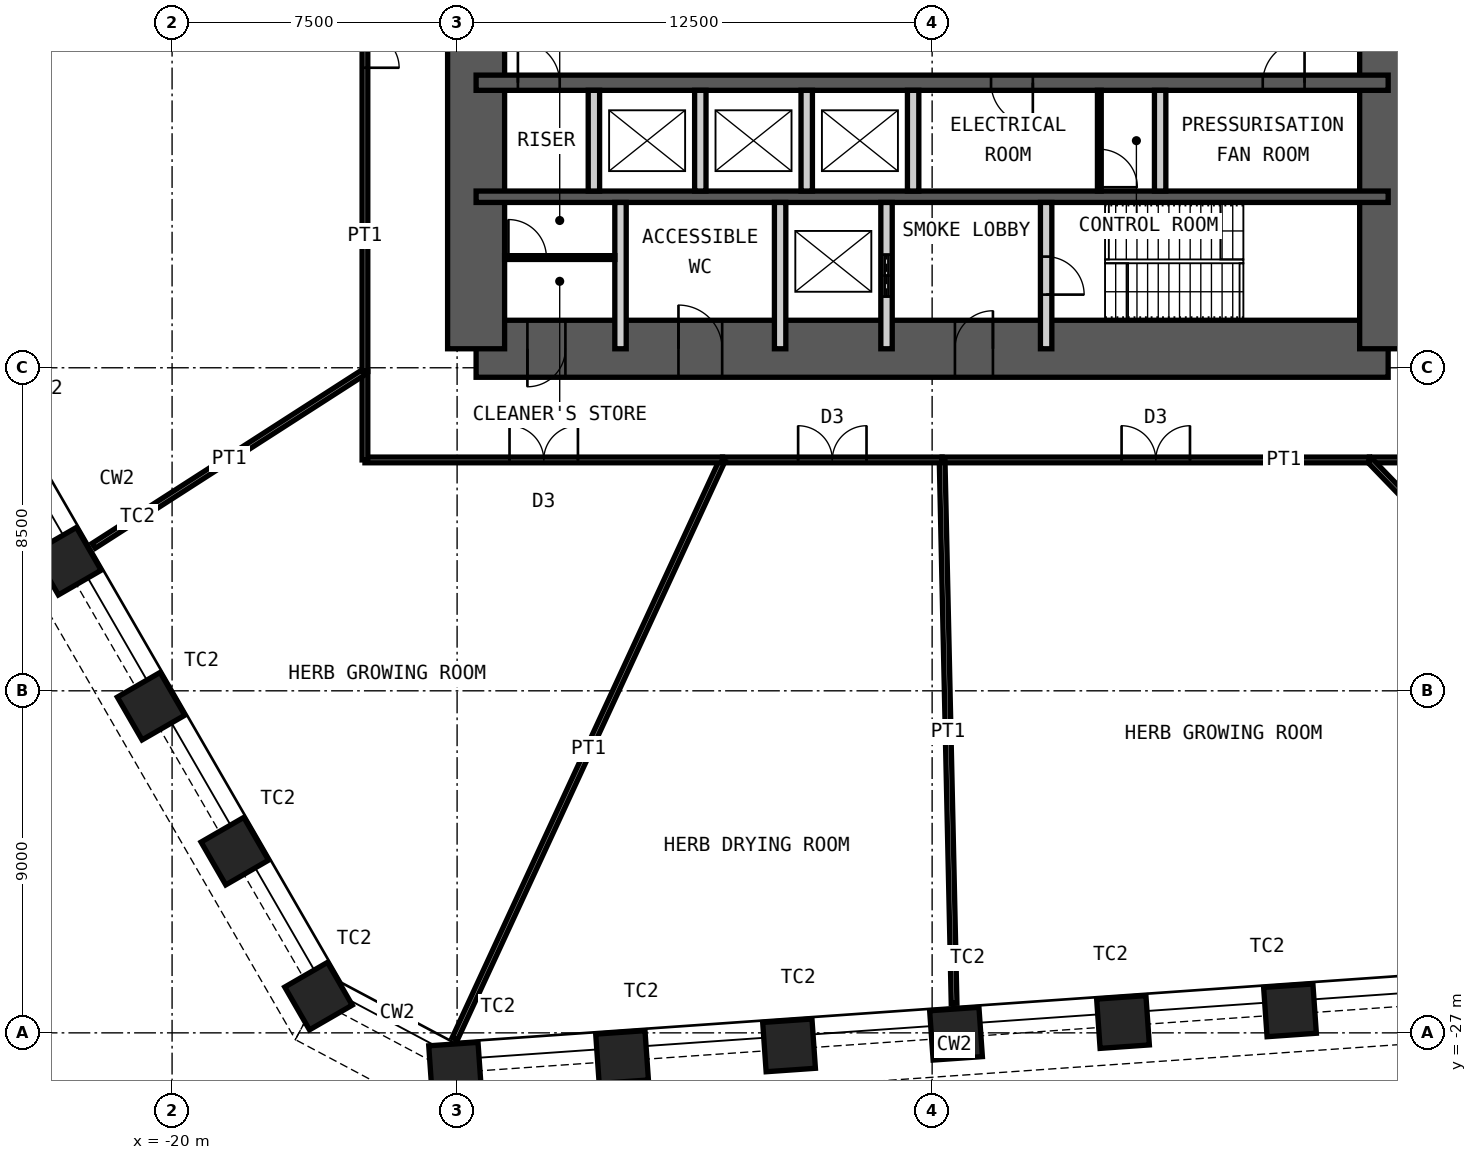
"""IFC4 building model, lengths in metres.
Left out: names, types, materials, properties, quantities, classifications, styles, units other than length and angle.
Written with IfcOpenShell. Run it as: python <this file> out.ifc"""

import sys

from ifc_helpers import new_model, si_unit, direction, frame, frame_2d, origin, origin_2d, place, context, subcontext, project, spatial, rectangle, hollow_rectangle, extrude, element, fill, save


model = new_model("IFC4")
c1 = context("Model", 3, precision=1e-05, world=origin(), true_north=direction((0.0, 1.0)))
c2 = subcontext(c1, "Body", "Model", "MODEL_VIEW")
j1 = project(units=[si_unit("LENGTHUNIT", "METRE"), si_unit("PLANEANGLEUNIT", "RADIAN")], contexts=[c1])
p1 = place(None, origin())
s1 = spatial("IfcSite", under=j1, at=p1, CompositionType="ELEMENT")
p2 = place(p1, origin())
s2 = spatial("IfcBuilding", under=s1, at=p2, CompositionType="ELEMENT")
p3 = place(p2, frame((0.0, 0.0, 57.0)))
s3 = spatial("IfcBuildingStorey", under=s2, at=p3, CompositionType="ELEMENT", Elevation=57.0)
for number, where, z_axis, x_axis in (
    (1, (9.417, -26.407, 0.0), (0.0, 0.0, 1.0), (0.998, 0.07, 0.0)),
    (2, (5.023, -26.715, 0.0), (0.0, 0.0, 1.0), (0.998, 0.07, 0.0)),
    (3, (0.629, -27.022, 0.0), (0.0, 0.0, 1.0), (0.998, 0.07, 0.0)),
    (4, (-3.765, -27.329, 0.0), (0.0, 0.0, 1.0), (0.998, 0.07, 0.0)),
    (5, (-8.159, -27.636, 0.0), (0.0, 0.0, 1.0), (0.998, 0.07, 0.0)),
    (6, (-12.553, -27.944, 0.0), (0.0, 0.0, 1.0), (0.998, 0.07, 0.0)),
    (7, (-16.147, -26.033, 0.0), (0.0, 0.0, 1.0), (0.5, -0.866, 0.0)),
    (8, (-18.349, -22.218, 0.0), (0.0, 0.0, 1.0), (0.5, -0.866, 0.0)),
    (9, (-20.552, -18.404, 0.0), (0.0, 0.0, 1.0), (0.5, -0.866, 0.0)),
    (10, (-22.754, -14.589, 0.0), (0.0, 0.0, 1.0), (0.5, -0.866, 0.0)),
):
    element("IfcColumn", number, at=place(p3, frame(where, z_axis=z_axis, x_axis=x_axis)), inside=s3, PredefinedType="COLUMN", context=c2, shape_type="SweptSolid", body=[
        extrude(hollow_rectangle(XDim=1.3, YDim=1.3, WallThickness=0.1, at=origin_2d()), origin(), (0.0, 0.0, 1.0), 5.0),
    ])
p4 = place(p3, frame((-12.0, -9.0, 0.0), z_axis=(0.0, 0.0, 1.0), x_axis=(1.0, 0.0, 0.0)))
e11 = element("IfcWall", 11, at=p4, inside=s3, PredefinedType="SHEAR", context=c2, shape_type="SweptSolid", body=[
    extrude(rectangle(XDim=24.0, YDim=1.5, at=frame_2d((12.0, 0.0))), origin(), (0.0, 0.0, 1.0), 5.0),
])
p5 = place(p4, frame((1.35, 0.0, 0.0)))
e12 = element("IfcOpeningElement", 12, at=p5, cuts=e11, PredefinedType="OPENING", context=c2, shape_type="SweptSolid", body=[
    extrude(rectangle(XDim=1.0, YDim=2.1, at=frame_2d((0.5, 1.05))), frame((0.0, 0.76, 0.0), z_axis=(0.0, -1.0, 0.0), x_axis=(1.0, 0.0, 0.0)), (0.0, 0.0, 1.0), 1.52),
])
p6 = place(p4, frame((5.325, 0.0, 0.0)))
e13 = element("IfcOpeningElement", 13, at=p6, cuts=e11, PredefinedType="OPENING", context=c2, shape_type="SweptSolid", body=[
    extrude(rectangle(XDim=1.15, YDim=2.1, at=frame_2d((0.575, 1.05))), frame((0.0, 0.76, 0.0), z_axis=(0.0, -1.0, 0.0), x_axis=(1.0, 0.0, 0.0)), (0.0, 0.0, 1.0), 1.52),
])
p7 = place(p4, frame((12.6, 0.0, 0.0)))
e14 = element("IfcOpeningElement", 14, at=p7, cuts=e11, PredefinedType="OPENING", context=c2, shape_type="SweptSolid", body=[
    extrude(rectangle(XDim=1.0, YDim=2.1, at=frame_2d((0.5, 1.05))), frame((0.0, 0.76, 0.0), z_axis=(0.0, -1.0, 0.0), x_axis=(1.0, 0.0, 0.0)), (0.0, 0.0, 1.0), 1.52),
])
p8 = place(p3, frame((12.0, -9.0, 0.0), z_axis=(0.0, 0.0, 1.0), x_axis=(0.0, 1.0, 0.0)))
e15 = element("IfcWall", 15, at=p8, inside=s3, PredefinedType="SHEAR", context=c2, shape_type="SweptSolid", body=[
    extrude(rectangle(XDim=18.0, YDim=1.5, at=frame_2d((9.0, 0.0))), origin(), (0.0, 0.0, 1.0), 5.0),
])
p9 = place(p8, frame((8.1, 0.0, 0.0)))
e16 = element("IfcOpeningElement", 16, at=p9, cuts=e15, PredefinedType="OPENING", context=c2, shape_type="SweptSolid", body=[
    extrude(rectangle(XDim=1.8, YDim=2.1, at=frame_2d((0.9, 1.05))), frame((0.0, 0.76, 0.0), z_axis=(0.0, -1.0, 0.0), x_axis=(1.0, 0.0, 0.0)), (0.0, 0.0, 1.0), 1.52),
])
p10 = place(p3, frame((-12.0, -9.0, 0.0), z_axis=(0.0, 0.0, 1.0), x_axis=(0.0, 1.0, 0.0)))
e17 = element("IfcWall", 17, at=p10, inside=s3, PredefinedType="SHEAR", context=c2, shape_type="SweptSolid", body=[
    extrude(rectangle(XDim=18.0, YDim=1.5, at=frame_2d((9.0, 0.0))), origin(), (0.0, 0.0, 1.0), 5.0),
])
p11 = place(p10, frame((8.1, 0.0, 0.0)))
e18 = element("IfcOpeningElement", 18, at=p11, cuts=e17, PredefinedType="OPENING", context=c2, shape_type="SweptSolid", body=[
    extrude(rectangle(XDim=1.8, YDim=2.1, at=frame_2d((0.9, 1.05))), frame((0.0, 0.76, 0.0), z_axis=(0.0, -1.0, 0.0), x_axis=(1.0, 0.0, 0.0)), (0.0, 0.0, 1.0), 1.52),
])
p12 = place(p3, frame((-12.0, -2.0, 0.0), z_axis=(0.0, 0.0, 1.0), x_axis=(1.0, 0.0, 0.0)))
e19 = element("IfcWall", 19, at=p12, inside=s3, PredefinedType="SHEAR", context=c2, shape_type="SweptSolid", body=[
    extrude(rectangle(XDim=24.0, YDim=0.4, at=frame_2d((12.0, 0.0))), origin(), (0.0, 0.0, 1.0), 5.0),
])
p13 = place(p12, frame((1.1, 0.0, 0.0)))
e20 = element("IfcOpeningElement", 20, at=p13, cuts=e19, PredefinedType="OPENING", context=c2, shape_type="SweptSolid", body=[
    extrude(rectangle(XDim=1.1, YDim=2.1, at=frame_2d((0.55, 1.05))), frame((0.0, 0.21, 0.0), z_axis=(0.0, -1.0, 0.0), x_axis=(1.0, 0.0, 0.0)), (0.0, 0.0, 1.0), 0.42),
])
p14 = place(p12, frame((13.55, 0.0, 0.0)))
e21 = element("IfcOpeningElement", 21, at=p14, cuts=e19, PredefinedType="OPENING", context=c2, shape_type="SweptSolid", body=[
    extrude(rectangle(XDim=1.1, YDim=2.1, at=frame_2d((0.55, 1.05))), frame((0.0, 0.21, 0.0), z_axis=(0.0, -1.0, 0.0), x_axis=(1.0, 0.0, 0.0)), (0.0, 0.0, 1.0), 0.42),
])
p15 = place(p12, frame((20.7, 0.0, 0.0)))
e22 = element("IfcOpeningElement", 22, at=p15, cuts=e19, PredefinedType="OPENING", context=c2, shape_type="SweptSolid", body=[
    extrude(rectangle(XDim=1.1, YDim=2.1, at=frame_2d((0.55, 1.05))), frame((0.0, 0.21, 0.0), z_axis=(0.0, -1.0, 0.0), x_axis=(1.0, 0.0, 0.0)), (0.0, 0.0, 1.0), 0.42),
])
p16 = place(p3, frame((-12.0, -5.0, 0.0), z_axis=(0.0, 0.0, 1.0), x_axis=(1.0, 0.0, 0.0)))
e23 = element("IfcWall", 23, at=p16, inside=s3, PredefinedType="SHEAR", context=c2, shape_type="SweptSolid", body=[
    extrude(rectangle(XDim=24.0, YDim=0.3, at=frame_2d((12.0, 0.0))), origin(), (0.0, 0.0, 1.0), 5.0),
])
for number, where, z_axis, x_axis in (
    (24, (-8.9, -4.85, 0.0), (0.0, 0.0, 1.0), (0.0, 1.0, 0.0)),
    (25, (-6.1, -4.85, 0.0), (0.0, 0.0, 1.0), (0.0, 1.0, 0.0)),
    (26, (-3.3, -4.85, 0.0), (0.0, 0.0, 1.0), (0.0, 1.0, 0.0)),
    (27, (-0.5, -4.85, 0.0), (0.0, 0.0, 1.0), (0.0, 1.0, 0.0)),
    (28, (6.0, -4.85, 0.0), (0.0, 0.0, 1.0), (0.0, 1.0, 0.0)),
):
    element("IfcWall", number, at=place(p3, frame(where, z_axis=z_axis, x_axis=x_axis)), inside=s3, PredefinedType="PARTITIONING", context=c2, shape_type="SweptSolid", body=[
        extrude(rectangle(XDim=2.65, YDim=0.3, at=frame_2d((1.325, 0.0))), origin(), (0.0, 0.0, 1.0), 4.78),
    ])
for number, where, z_axis, x_axis in (
    (29, (-8.2, -9.0, 0.0), (0.0, 0.0, 1.0), (0.0, 1.0, 0.0)),
    (30, (-4.0, -9.0, 0.0), (0.0, 0.0, 1.0), (0.0, 1.0, 0.0)),
):
    element("IfcWall", number, at=place(p3, frame(where, z_axis=z_axis, x_axis=x_axis)), inside=s3, PredefinedType="PARTITIONING", context=c2, shape_type="SweptSolid", body=[
        extrude(rectangle(XDim=3.85, YDim=0.3, at=frame_2d((1.925, 0.0))), origin(), (0.0, 0.0, 1.0), 4.78),
    ])
p17 = place(p3, frame((-1.2, -9.0, 0.0), z_axis=(0.0, 0.0, 1.0), x_axis=(0.0, 1.0, 0.0)))
e31 = element("IfcWall", 31, at=p17, inside=s3, PredefinedType="PARTITIONING", context=c2, shape_type="SweptSolid", body=[
    extrude(rectangle(XDim=3.85, YDim=0.3, at=frame_2d((1.925, 0.0))), origin(), (0.0, 0.0, 1.0), 4.78),
])
p18 = place(p17, frame((1.375, 0.0, 0.0)))
e32 = element("IfcOpeningElement", 32, at=p18, cuts=e31, PredefinedType="OPENING", context=c2, shape_type="SweptSolid", body=[
    extrude(rectangle(XDim=1.1, YDim=2.4, at=frame_2d((0.55, 1.2))), frame((0.0, 0.16, 0.0), z_axis=(0.0, -1.0, 0.0), x_axis=(1.0, 0.0, 0.0)), (0.0, 0.0, 1.0), 0.32),
])
p19 = place(p3, frame((3.0, -9.0, 0.0), z_axis=(0.0, 0.0, 1.0), x_axis=(0.0, 1.0, 0.0)))
e33 = element("IfcWall", 33, at=p19, inside=s3, PredefinedType="PARTITIONING", context=c2, shape_type="SweptSolid", body=[
    extrude(rectangle(XDim=3.85, YDim=0.3, at=frame_2d((1.925, 0.0))), origin(), (0.0, 0.0, 1.0), 4.78),
])
p20 = place(p19, frame((1.425, 0.0, 0.0)))
e34 = element("IfcOpeningElement", 34, at=p20, cuts=e33, PredefinedType="OPENING", context=c2, shape_type="SweptSolid", body=[
    extrude(rectangle(XDim=1.0, YDim=2.1, at=frame_2d((0.5, 1.05))), frame((0.0, 0.16, 0.0), z_axis=(0.0, -1.0, 0.0), x_axis=(1.0, 0.0, 0.0)), (0.0, 0.0, 1.0), 0.32),
])
p21 = place(p3, frame((4.4, -4.85, 0.0), z_axis=(0.0, 0.0, 1.0), x_axis=(0.0, 1.0, 0.0)))
e35 = element("IfcWall", 35, at=p21, inside=s3, PredefinedType="PARTITIONING", context=c2, shape_type="SweptSolid", body=[
    extrude(rectangle(XDim=2.65, YDim=0.1, at=frame_2d((1.325, 0.0))), origin(), (0.0, 0.0, 1.0), 4.78),
])
p22 = place(p21, frame((0.1, 0.0, 0.0)))
e36 = element("IfcOpeningElement", 36, at=p22, cuts=e35, PredefinedType="OPENING", context=c2, shape_type="SweptSolid", body=[
    extrude(rectangle(XDim=1.0, YDim=2.4, at=frame_2d((0.5, 1.2))), frame((0.0, 0.06, 0.0), z_axis=(0.0, -1.0, 0.0), x_axis=(1.0, 0.0, 0.0)), (0.0, 0.0, 1.0), 0.12),
])
p23 = place(p3, frame((-11.25, -6.6, 0.0), z_axis=(0.0, 0.0, 1.0), x_axis=(1.0, 0.0, 0.0)))
e37 = element("IfcWall", 37, at=p23, inside=s3, PredefinedType="PARTITIONING", context=c2, shape_type="SweptSolid", body=[
    extrude(rectangle(XDim=2.9, YDim=0.1, at=frame_2d((1.45, 0.0))), origin(), (0.0, 0.0, 1.0), 4.78),
])
p24 = place(p23, frame((0.1, 0.0, 0.0)))
e38 = element("IfcOpeningElement", 38, at=p24, cuts=e37, PredefinedType="OPENING", context=c2, shape_type="SweptSolid", body=[
    extrude(rectangle(XDim=1.0, YDim=2.4, at=frame_2d((0.5, 1.2))), frame((0.0, 0.06, 0.0), z_axis=(0.0, -1.0, 0.0), x_axis=(1.0, 0.0, 0.0)), (0.0, 0.0, 1.0), 0.12),
])
p25 = place(p3, frame((14.925, -11.925, 0.0), z_axis=(0.0, 0.0, 1.0), x_axis=(-1.0, 0.0, 0.0)))
e39 = element("IfcWall", 39, at=p25, inside=s3, PredefinedType="PARTITIONING", context=c2, shape_type="SweptSolid", body=[
    extrude(rectangle(XDim=3.417, YDim=0.15, at=frame_2d((1.709, 0.0))), origin(), (0.0, 0.0, 1.0), 4.8),
])
p26 = place(p3, frame((18.931, -19.618, 0.0), z_axis=(0.0, 0.0, 1.0), x_axis=(-0.694400087022, 0.719589132175, 0.0)))
e40 = element("IfcWall", 40, at=p26, inside=s3, PredefinedType="PARTITIONING", context=c2, shape_type="SweptSolid", body=[
    extrude(rectangle(XDim=10.691, YDim=0.15, at=frame_2d((5.345, 0.0))), origin(), (0.0, 0.0, 1.0), 3.7),
])
p27 = place(p3, frame((11.508, -11.925, 0.0), z_axis=(0.0, 0.0, 1.0), x_axis=(-1.0, 0.0, 0.0)))
e41 = element("IfcWall", 41, at=p27, inside=s3, PredefinedType="PARTITIONING", context=c2, shape_type="SweptSolid", body=[
    extrude(rectangle(XDim=11.245, YDim=0.15, at=frame_2d((5.623, 0.0))), origin(), (0.0, 0.0, 1.0), 4.8),
])
p28 = place(p27, frame((4.722, 0.0, 0.0)))
e42 = element("IfcOpeningElement", 42, at=p28, cuts=e41, PredefinedType="OPENING", context=c2, shape_type="SweptSolid", body=[
    extrude(rectangle(XDim=1.8, YDim=2.4, at=frame_2d((0.9, 1.2))), frame((0.0, 0.085, 0.0), z_axis=(0.0, -1.0, 0.0), x_axis=(1.0, 0.0, 0.0)), (0.0, 0.0, 1.0), 0.17),
])
p29 = place(p3, frame((0.578, -26.224, 0.0), z_axis=(0.0, 0.0, 1.0), x_axis=(-0.022037776667, 0.999757138709, 0.0)))
e43 = element("IfcWall", 43, at=p29, inside=s3, PredefinedType="PARTITIONING", context=c2, shape_type="SweptSolid", body=[
    extrude(rectangle(XDim=14.302, YDim=0.15, at=frame_2d((7.151, 0.0))), origin(), (0.0, 0.0, 1.0), 3.7),
])
p30 = place(p3, frame((0.263, -11.925, 0.0), z_axis=(0.0, 0.0, 1.0), x_axis=(-1.0, 0.0, 0.0)))
e44 = element("IfcWall", 44, at=p30, inside=s3, PredefinedType="PARTITIONING", context=c2, shape_type="SweptSolid", body=[
    extrude(rectangle(XDim=5.778, YDim=0.15, at=frame_2d((2.889, 0.0))), origin(), (0.0, 0.0, 1.0), 4.8),
])
p31 = place(p30, frame((1.989, 0.0, 0.0)))
e45 = element("IfcOpeningElement", 45, at=p31, cuts=e44, PredefinedType="OPENING", context=c2, shape_type="SweptSolid", body=[
    extrude(rectangle(XDim=1.8, YDim=2.4, at=frame_2d((0.9, 1.2))), frame((0.0, 0.085, 0.0), z_axis=(0.0, -1.0, 0.0), x_axis=(1.0, 0.0, 0.0)), (0.0, 0.0, 1.0), 0.17),
])
p32 = place(p3, frame((-12.56, -27.155, 0.0), z_axis=(0.0, 0.0, 1.0), x_axis=(0.41979248878, 0.90762011126, 0.0)))
e46 = element("IfcWall", 46, at=p32, inside=s3, PredefinedType="PARTITIONING", context=c2, shape_type="SweptSolid", body=[
    extrude(rectangle(XDim=16.78, YDim=0.15, at=frame_2d((8.39, 0.0))), origin(), (0.0, 0.0, 1.0), 3.7),
])
p33 = place(p3, frame((-5.516, -11.925, 0.0), z_axis=(0.0, 0.0, 1.0), x_axis=(-1.0, 0.0, 0.0)))
e47 = element("IfcWall", 47, at=p33, inside=s3, PredefinedType="PARTITIONING", context=c2, shape_type="SweptSolid", body=[
    extrude(rectangle(XDim=9.409, YDim=0.15, at=frame_2d((4.705, 0.0))), origin(), (0.0, 0.0, 1.0), 4.8),
])
p34 = place(p33, frame((3.805, 0.0, 0.0)))
e48 = element("IfcOpeningElement", 48, at=p34, cuts=e47, PredefinedType="OPENING", context=c2, shape_type="SweptSolid", body=[
    extrude(rectangle(XDim=1.8, YDim=2.4, at=frame_2d((0.9, 1.2))), frame((0.0, 0.085, 0.0), z_axis=(0.0, -1.0, 0.0), x_axis=(1.0, 0.0, 0.0)), (0.0, 0.0, 1.0), 0.17),
])
p35 = place(p3, frame((-14.925, -11.925, 0.0), z_axis=(0.0, 0.0, 1.0), x_axis=(0.0, 1.0, 0.0)))
e49 = element("IfcWall", 49, at=p35, inside=s3, PredefinedType="PARTITIONING", context=c2, shape_type="SweptSolid", body=[
    extrude(rectangle(XDim=2.329, YDim=0.15, at=frame_2d((1.165, 0.0))), origin(), (0.0, 0.0, 1.0), 4.8),
])
p36 = place(p3, frame((-22.063, -14.185, 0.0), z_axis=(0.0, 0.0, 1.0), x_axis=(0.841158845851, 0.540788124912, 0.0)))
e50 = element("IfcWall", 50, at=p36, inside=s3, PredefinedType="PARTITIONING", context=c2, shape_type="SweptSolid", body=[
    extrude(rectangle(XDim=8.486, YDim=0.15, at=frame_2d((4.243, 0.0))), origin(), (0.0, 0.0, 1.0), 3.7),
])
p37 = place(p3, frame((-14.925, -9.596, 0.0), z_axis=(0.0, 0.0, 1.0), x_axis=(0.0, 1.0, 0.0)))
e51 = element("IfcWall", 51, at=p37, inside=s3, PredefinedType="PARTITIONING", context=c2, shape_type="SweptSolid", body=[
    extrude(rectangle(XDim=17.78, YDim=0.15, at=frame_2d((8.89, 0.0))), origin(), (0.0, 0.0, 1.0), 4.8),
])
p38 = place(p37, frame((7.99, 0.0, 0.0)))
e52 = element("IfcOpeningElement", 52, at=p38, cuts=e51, PredefinedType="OPENING", context=c2, shape_type="SweptSolid", body=[
    extrude(rectangle(XDim=1.8, YDim=2.4, at=frame_2d((0.9, 1.2))), frame((0.0, 0.085, 0.0), z_axis=(0.0, -1.0, 0.0), x_axis=(1.0, 0.0, 0.0)), (0.0, 0.0, 1.0), 0.17),
])
p39 = place(p5, origin())
e53 = element("IfcDoor", 53, at=p39, inside=s3, OperationType="SINGLE_SWING_LEFT", PredefinedType="DOOR", context=c2, shape_type="SweptSolid", body=[
    extrude(rectangle(XDim=1.0, YDim=2.1, at=frame_2d((0.5, 1.05))), frame((0.0, 0.025, 0.0), z_axis=(0.0, -1.0, 0.0), x_axis=(1.0, 0.0, 0.0)), (0.0, 0.0, 1.0), 0.05),
])
fill(e12, e53)
p40 = place(p6, origin())
e54 = element("IfcDoor", 54, at=p40, inside=s3, OperationType="SINGLE_SWING_RIGHT", PredefinedType="DOOR", context=c2, shape_type="SweptSolid", body=[
    extrude(rectangle(XDim=1.15, YDim=2.1, at=frame_2d((0.575, 1.05))), frame((0.0, 0.025, 0.0), z_axis=(0.0, -1.0, 0.0), x_axis=(1.0, 0.0, 0.0)), (0.0, 0.0, 1.0), 0.05),
])
fill(e13, e54)
p41 = place(p7, origin())
e55 = element("IfcDoor", 55, at=p41, inside=s3, OperationType="SINGLE_SWING_LEFT", PredefinedType="DOOR", context=c2, shape_type="SweptSolid", body=[
    extrude(rectangle(XDim=1.0, YDim=2.1, at=frame_2d((0.5, 1.05))), frame((0.0, 0.025, 0.0), z_axis=(0.0, -1.0, 0.0), x_axis=(1.0, 0.0, 0.0)), (0.0, 0.0, 1.0), 0.05),
])
fill(e14, e55)
p42 = place(p20, origin())
e56 = element("IfcDoor", 56, at=p42, inside=s3, OperationType="SINGLE_SWING_LEFT", PredefinedType="DOOR", context=c2, shape_type="SweptSolid", body=[
    extrude(rectangle(XDim=1.0, YDim=2.1, at=frame_2d((0.5, 1.05))), frame((0.0, 0.025, 0.0), z_axis=(0.0, -1.0, 0.0), x_axis=(1.0, 0.0, 0.0)), (0.0, 0.0, 1.0), 0.05),
])
fill(e34, e56)
p43 = place(p13, origin())
e57 = element("IfcDoor", 57, at=p43, inside=s3, OperationType="SINGLE_SWING_RIGHT", PredefinedType="DOOR", context=c2, shape_type="SweptSolid", body=[
    extrude(rectangle(XDim=1.1, YDim=2.1, at=frame_2d((0.55, 1.05))), frame((0.0, 0.025, 0.0), z_axis=(0.0, -1.0, 0.0), x_axis=(1.0, 0.0, 0.0)), (0.0, 0.0, 1.0), 0.05),
])
fill(e20, e57)
p44 = place(p14, origin())
e58 = element("IfcDoor", 58, at=p44, inside=s3, OperationType="SINGLE_SWING_RIGHT", PredefinedType="DOOR", context=c2, shape_type="SweptSolid", body=[
    extrude(rectangle(XDim=1.1, YDim=2.1, at=frame_2d((0.55, 1.05))), frame((0.0, 0.025, 0.0), z_axis=(0.0, -1.0, 0.0), x_axis=(1.0, 0.0, 0.0)), (0.0, 0.0, 1.0), 0.05),
])
fill(e21, e58)
p45 = place(p15, origin())
e59 = element("IfcDoor", 59, at=p45, inside=s3, OperationType="SINGLE_SWING_LEFT", PredefinedType="DOOR", context=c2, shape_type="SweptSolid", body=[
    extrude(rectangle(XDim=1.1, YDim=2.1, at=frame_2d((0.55, 1.05))), frame((0.0, 0.025, 0.0), z_axis=(0.0, -1.0, 0.0), x_axis=(1.0, 0.0, 0.0)), (0.0, 0.0, 1.0), 0.05),
])
fill(e22, e59)
p46 = place(p18, origin())
e60 = element("IfcDoor", 60, at=p46, inside=s3, OperationType="DOUBLE_DOOR_SLIDING", PredefinedType="DOOR", context=c2, shape_type="SweptSolid", body=[
    extrude(rectangle(XDim=1.1, YDim=2.4, at=frame_2d((0.55, 1.2))), frame((0.0, 0.025, 0.0), z_axis=(0.0, -1.0, 0.0), x_axis=(1.0, 0.0, 0.0)), (0.0, 0.0, 1.0), 0.05),
])
fill(e32, e60)
p47 = place(p22, origin())
e61 = element("IfcDoor", 61, at=p47, inside=s3, OperationType="SINGLE_SWING_LEFT", PredefinedType="DOOR", context=c2, shape_type="SweptSolid", body=[
    extrude(rectangle(XDim=1.0, YDim=2.4, at=frame_2d((0.5, 1.2))), frame((0.0, 0.025, 0.0), z_axis=(0.0, -1.0, 0.0), x_axis=(1.0, 0.0, 0.0)), (0.0, 0.0, 1.0), 0.05),
])
fill(e36, e61)
p48 = place(p24, origin())
e62 = element("IfcDoor", 62, at=p48, inside=s3, OperationType="SINGLE_SWING_RIGHT", PredefinedType="DOOR", context=c2, shape_type="SweptSolid", body=[
    extrude(rectangle(XDim=1.0, YDim=2.4, at=frame_2d((0.5, 1.2))), frame((0.0, 0.025, 0.0), z_axis=(0.0, -1.0, 0.0), x_axis=(1.0, 0.0, 0.0)), (0.0, 0.0, 1.0), 0.05),
])
fill(e38, e62)
p49 = place(p28, origin())
e63 = element("IfcDoor", 63, at=p49, inside=s3, OperationType="DOUBLE_DOOR_DOUBLE_SWING", PredefinedType="DOOR", context=c2, shape_type="SweptSolid", body=[
    extrude(rectangle(XDim=1.8, YDim=2.4, at=frame_2d((0.9, 1.2))), frame((0.0, 0.025, 0.0), z_axis=(0.0, -1.0, 0.0), x_axis=(1.0, 0.0, 0.0)), (0.0, 0.0, 1.0), 0.05),
])
fill(e42, e63)
p50 = place(p31, origin())
e64 = element("IfcDoor", 64, at=p50, inside=s3, OperationType="DOUBLE_DOOR_DOUBLE_SWING", PredefinedType="DOOR", context=c2, shape_type="SweptSolid", body=[
    extrude(rectangle(XDim=1.8, YDim=2.4, at=frame_2d((0.9, 1.2))), frame((0.0, 0.025, 0.0), z_axis=(0.0, -1.0, 0.0), x_axis=(1.0, 0.0, 0.0)), (0.0, 0.0, 1.0), 0.05),
])
fill(e45, e64)
p51 = place(p34, origin())
e65 = element("IfcDoor", 65, at=p51, inside=s3, OperationType="DOUBLE_DOOR_DOUBLE_SWING", PredefinedType="DOOR", context=c2, shape_type="SweptSolid", body=[
    extrude(rectangle(XDim=1.8, YDim=2.4, at=frame_2d((0.9, 1.2))), frame((0.0, 0.025, 0.0), z_axis=(0.0, -1.0, 0.0), x_axis=(1.0, 0.0, 0.0)), (0.0, 0.0, 1.0), 0.05),
])
fill(e48, e65)
p52 = place(p38, origin())
e66 = element("IfcDoor", 66, at=p52, inside=s3, OperationType="DOUBLE_DOOR_DOUBLE_SWING", PredefinedType="DOOR", context=c2, shape_type="SweptSolid", body=[
    extrude(rectangle(XDim=1.8, YDim=2.4, at=frame_2d((0.9, 1.2))), frame((0.0, 0.025, 0.0), z_axis=(0.0, -1.0, 0.0), x_axis=(1.0, 0.0, 0.0)), (0.0, 0.0, 1.0), 0.05),
])
fill(e52, e66)
save(model, sys.argv[1])
